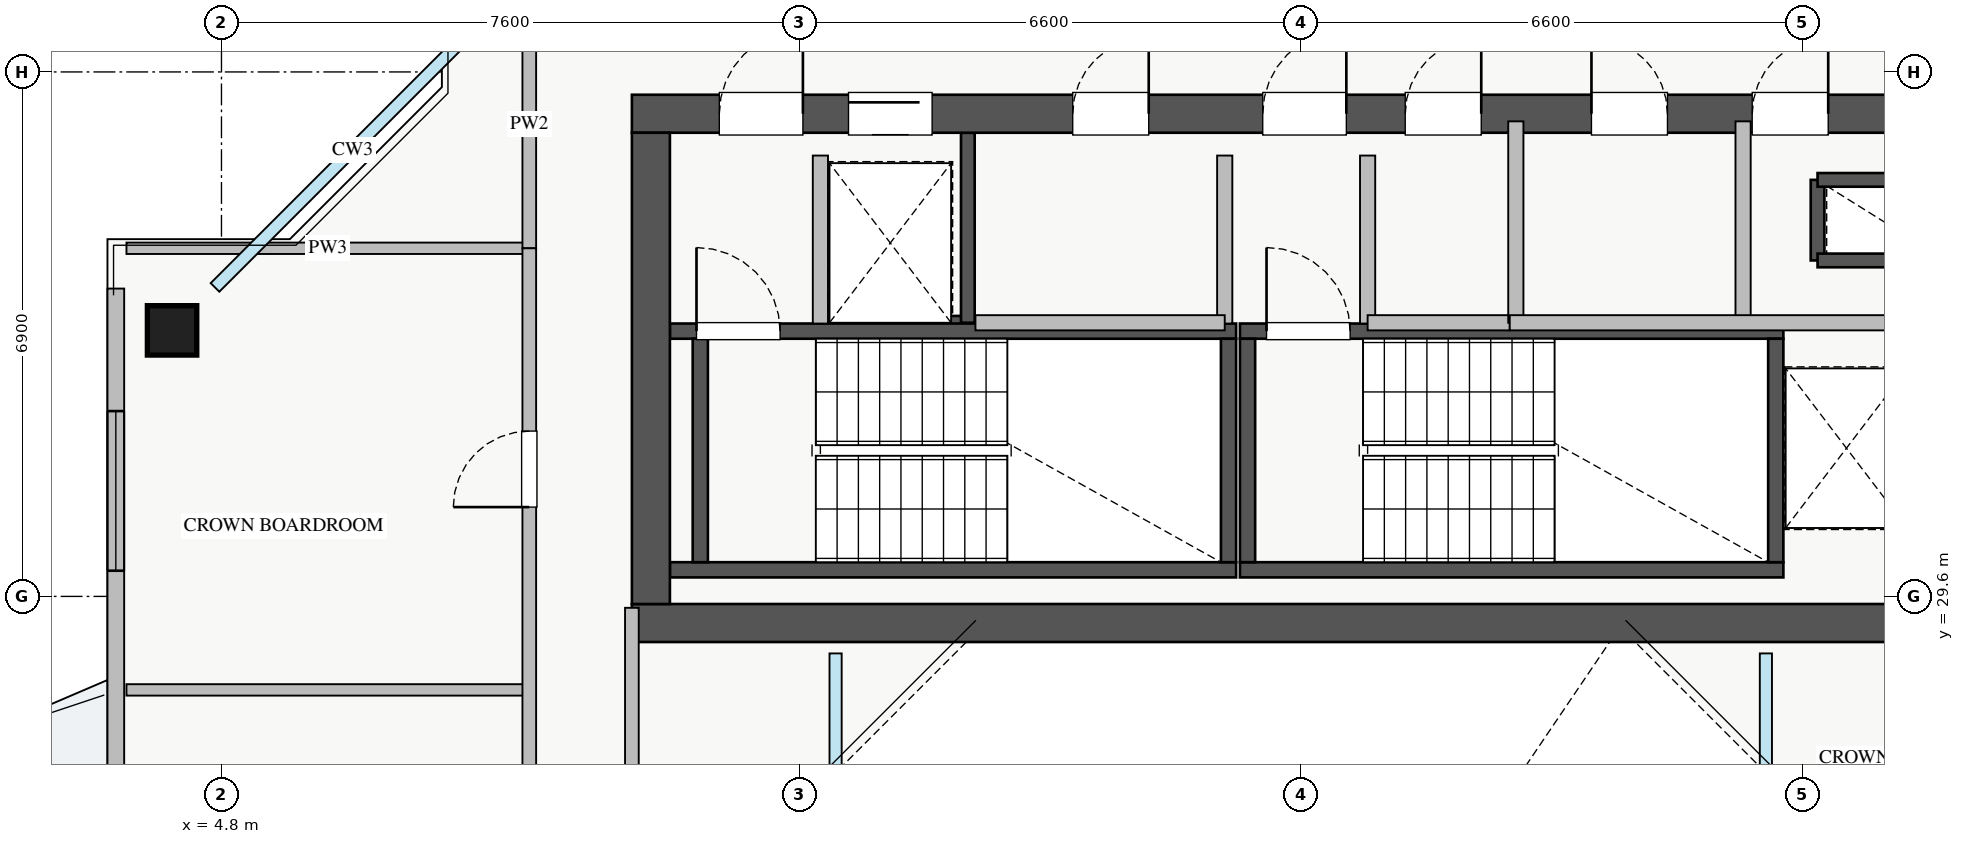
"""IFC4 building model, lengths in metres.
Left out: names, types, materials, properties, quantities, classifications, styles, units other than length and angle.
Written with IfcOpenShell. Run it as: python <this file> out.ifc"""

import sys

from ifc_helpers import new_model, si_unit, direction, frame, frame_2d, origin, origin_2d, place, context, subcontext, project, spatial, rectangle, extrude, source, transform, mapped, element, fill, save


model = new_model("IFC4")
c1 = context("Model", 3, precision=1e-05, world=origin(), true_north=direction((0.0, 1.0)))
c2 = subcontext(c1, "Body", "Model", "MODEL_VIEW")
j1 = project(units=[si_unit("LENGTHUNIT", "METRE"), si_unit("PLANEANGLEUNIT", "RADIAN")], contexts=[c1])
p1 = place(None, origin())
s1 = spatial("IfcSite", under=j1, at=p1, CompositionType="ELEMENT")
p2 = place(p1, origin())
s2 = spatial("IfcBuilding", under=s1, at=p2, CompositionType="ELEMENT")
p3 = place(p2, frame((0.0, 0.0, 237.25)))
s3 = spatial("IfcBuildingStorey", under=s2, at=p3, CompositionType="ELEMENT", Elevation=237.25)
p4 = place(p3, frame((12.68, 33.2, 0.0), z_axis=(0.0, 0.0, 1.0), x_axis=(1.0, 0.0, 0.0)))
e1 = element("IfcWall", 1, at=p4, inside=s3, PredefinedType="SHEAR", context=c2, shape_type="SweptSolid", body=[
    extrude(rectangle(XDim=1.94, YDim=0.18, at=frame_2d((0.97, 0.0))), origin(), (0.0, 0.0, 1.0), 3.07),
])
p5 = place(p3, frame((14.62, 33.2, 0.0), z_axis=(0.0, 0.0, 1.0), x_axis=(0.0, 1.0, 0.0)))
e2 = element("IfcWall", 2, at=p5, inside=s3, PredefinedType="SHEAR", context=c2, shape_type="SweptSolid", body=[
    extrude(rectangle(XDim=2.5, YDim=0.18, at=frame_2d((1.25, 0.0))), origin(), (0.0, 0.0, 1.0), 3.07),
])
p6 = place(p3, frame((25.8, 34.02, 0.0), z_axis=(0.0, 0.0, 1.0), x_axis=(0.0, 1.0, 0.0)))
e3 = element("IfcWall", 3, at=p6, inside=s3, PredefinedType="SHEAR", context=c2, shape_type="SweptSolid", body=[
    extrude(rectangle(XDim=1.06, YDim=0.18, at=frame_2d((0.53, 0.0))), origin(), (0.0, 0.0, 1.0), 3.07),
])
for number, where, z_axis, x_axis in (
    (4, (25.8, 35.08, 0.0), (0.0, 0.0, 1.0), (1.0, 0.0, 0.0)),
    (5, (25.8, 34.02, 0.0), (0.0, 0.0, 1.0), (1.0, 0.0, 0.0)),
):
    element("IfcWall", number, at=place(p3, frame(where, z_axis=z_axis, x_axis=x_axis)), inside=s3, PredefinedType="SHEAR", context=c2, shape_type="SweptSolid", body=[
        extrude(rectangle(XDim=1.5, YDim=0.18, at=frame_2d((0.75, 0.0))), origin(), (0.0, 0.0, 1.0), 3.07),
    ])
p7 = place(p3, frame((10.7, 29.95, 0.0), z_axis=(0.0, 0.0, 1.0), x_axis=(1.0, 0.0, 0.0)))
e6 = element("IfcWall", 6, at=p7, inside=s3, PredefinedType="SHEAR", context=c2, shape_type="SweptSolid", body=[
    extrude(rectangle(XDim=7.45, YDim=0.2, at=frame_2d((3.725, 0.0))), origin(), (0.0, 0.0, 1.0), 3.25),
])
p8 = place(p3, frame((10.7, 33.09, 0.0), z_axis=(0.0, 0.0, 1.0), x_axis=(1.0, 0.0, 0.0)))
e7 = element("IfcWall", 7, at=p8, inside=s3, PredefinedType="SHEAR", context=c2, shape_type="SweptSolid", body=[
    extrude(rectangle(XDim=7.45, YDim=0.2, at=frame_2d((3.725, 0.0))), origin(), (0.0, 0.0, 1.0), 3.25),
])
p9 = place(p8, frame((0.35, 0.0, 0.0)))
e8 = element("IfcOpeningElement", 8, at=p9, cuts=e7, PredefinedType="OPENING", context=c2, shape_type="SweptSolid", body=[
    extrude(rectangle(XDim=1.1, YDim=2.05, at=frame_2d((0.55, 1.025))), frame((0.0, 0.11, 0.0), z_axis=(0.0, -1.0, 0.0), x_axis=(1.0, 0.0, 0.0)), (0.0, 0.0, 1.0), 0.22),
])
for number, where, z_axis, x_axis in (
    (9, (11.1, 30.05, 0.0), (0.0, 0.0, 1.0), (0.0, 1.0, 0.0)),
    (10, (18.05, 30.05, 0.0), (0.0, 0.0, 1.0), (0.0, 1.0, 0.0)),
):
    element("IfcWall", number, at=place(p3, frame(where, z_axis=z_axis, x_axis=x_axis)), inside=s3, PredefinedType="SHEAR", context=c2, shape_type="SweptSolid", body=[
        extrude(rectangle(XDim=2.94, YDim=0.2, at=frame_2d((1.47, 0.0))), origin(), (0.0, 0.0, 1.0), 3.25),
    ])
p10 = place(p3, frame((18.2, 29.95, 0.0), z_axis=(0.0, 0.0, 1.0), x_axis=(1.0, 0.0, 0.0)))
e11 = element("IfcWall", 11, at=p10, inside=s3, PredefinedType="SHEAR", context=c2, shape_type="SweptSolid", body=[
    extrude(rectangle(XDim=7.15, YDim=0.2, at=frame_2d((3.575, 0.0))), origin(), (0.0, 0.0, 1.0), 3.25),
])
p11 = place(p3, frame((18.2, 33.09, 0.0), z_axis=(0.0, 0.0, 1.0), x_axis=(1.0, 0.0, 0.0)))
e12 = element("IfcWall", 12, at=p11, inside=s3, PredefinedType="SHEAR", context=c2, shape_type="SweptSolid", body=[
    extrude(rectangle(XDim=7.15, YDim=0.2, at=frame_2d((3.575, 0.0))), origin(), (0.0, 0.0, 1.0), 3.25),
])
p12 = place(p11, frame((0.35, 0.0, 0.0)))
e13 = element("IfcOpeningElement", 13, at=p12, cuts=e12, PredefinedType="OPENING", context=c2, shape_type="SweptSolid", body=[
    extrude(rectangle(XDim=1.1, YDim=2.05, at=frame_2d((0.55, 1.025))), frame((0.0, 0.11, 0.0), z_axis=(0.0, -1.0, 0.0), x_axis=(1.0, 0.0, 0.0)), (0.0, 0.0, 1.0), 0.22),
])
for number, where, z_axis, x_axis in (
    (14, (18.3, 30.05, 0.0), (0.0, 0.0, 1.0), (0.0, 1.0, 0.0)),
    (15, (25.25, 30.05, 0.0), (0.0, 0.0, 1.0), (0.0, 1.0, 0.0)),
):
    element("IfcWall", number, at=place(p3, frame(where, z_axis=z_axis, x_axis=x_axis)), inside=s3, PredefinedType="SHEAR", context=c2, shape_type="SweptSolid", body=[
        extrude(rectangle(XDim=2.94, YDim=0.2, at=frame_2d((1.47, 0.0))), origin(), (0.0, 0.0, 1.0), 3.25),
    ])
p13 = place(p3, frame((10.2, 29.25, 0.0), z_axis=(0.0, 0.0, 1.0), x_axis=(1.0, 0.0, 0.0)))
e16 = element("IfcWall", 16, at=p13, inside=s3, PredefinedType="SHEAR", context=c2, shape_type="SweptSolid", body=[
    extrude(rectangle(XDim=17.6, YDim=0.5, at=frame_2d((8.8, 0.0))), origin(), (0.0, 0.0, 1.0), 3.25),
])
p14 = place(p3, frame((10.2, 35.95, 0.0), z_axis=(0.0, 0.0, 1.0), x_axis=(1.0, 0.0, 0.0)))
e17 = element("IfcWall", 17, at=p14, inside=s3, PredefinedType="SHEAR", context=c2, shape_type="SweptSolid", body=[
    extrude(rectangle(XDim=17.6, YDim=0.5, at=frame_2d((8.8, 0.0))), origin(), (0.0, 0.0, 1.0), 3.25),
])
p15 = place(p14, frame((1.15, 0.0, 0.0)))
e18 = element("IfcOpeningElement", 18, at=p15, cuts=e17, PredefinedType="OPENING", context=c2, shape_type="SweptSolid", body=[
    extrude(rectangle(XDim=1.1, YDim=2.05, at=frame_2d((0.55, 1.025))), frame((0.0, 0.26, 0.0), z_axis=(0.0, -1.0, 0.0), x_axis=(1.0, 0.0, 0.0)), (0.0, 0.0, 1.0), 0.52),
])
p16 = place(p14, frame((8.3, 0.0, 0.0)))
e19 = element("IfcOpeningElement", 19, at=p16, cuts=e17, PredefinedType="OPENING", context=c2, shape_type="SweptSolid", body=[
    extrude(rectangle(XDim=1.1, YDim=2.05, at=frame_2d((0.55, 1.025))), frame((0.0, 0.26, 0.0), z_axis=(0.0, -1.0, 0.0), x_axis=(1.0, 0.0, 0.0)), (0.0, 0.0, 1.0), 0.52),
])
p17 = place(p14, frame((2.85, 0.0, 0.0)))
e20 = element("IfcOpeningElement", 20, at=p17, cuts=e17, PredefinedType="OPENING", context=c2, shape_type="SweptSolid", body=[
    extrude(rectangle(XDim=1.1, YDim=2.05, at=frame_2d((0.55, 1.025))), frame((0.0, 0.26, 0.0), z_axis=(0.0, -1.0, 0.0), x_axis=(1.0, 0.0, 0.0)), (0.0, 0.0, 1.0), 0.52),
])
p18 = place(p14, frame((5.8, 0.0, 0.0)))
e21 = element("IfcOpeningElement", 21, at=p18, cuts=e17, PredefinedType="OPENING", context=c2, shape_type="SweptSolid", body=[
    extrude(rectangle(XDim=1.0, YDim=2.05, at=frame_2d((0.5, 1.025))), frame((0.0, 0.26, 0.0), z_axis=(0.0, -1.0, 0.0), x_axis=(1.0, 0.0, 0.0)), (0.0, 0.0, 1.0), 0.52),
])
p19 = place(p14, frame((14.74, 0.0, 0.0)))
e22 = element("IfcOpeningElement", 22, at=p19, cuts=e17, PredefinedType="OPENING", context=c2, shape_type="SweptSolid", body=[
    extrude(rectangle(XDim=1.0, YDim=2.05, at=frame_2d((0.5, 1.025))), frame((0.0, 0.26, 0.0), z_axis=(0.0, -1.0, 0.0), x_axis=(1.0, 0.0, 0.0)), (0.0, 0.0, 1.0), 0.52),
])
p20 = place(p14, frame((10.175, 0.0, 0.0)))
e23 = element("IfcOpeningElement", 23, at=p20, cuts=e17, PredefinedType="OPENING", context=c2, shape_type="SweptSolid", body=[
    extrude(rectangle(XDim=1.0, YDim=2.05, at=frame_2d((0.5, 1.025))), frame((0.0, 0.26, 0.0), z_axis=(0.0, -1.0, 0.0), x_axis=(1.0, 0.0, 0.0)), (0.0, 0.0, 1.0), 0.52),
])
p21 = place(p14, frame((12.625, 0.0, 0.0)))
e24 = element("IfcOpeningElement", 24, at=p21, cuts=e17, PredefinedType="OPENING", context=c2, shape_type="SweptSolid", body=[
    extrude(rectangle(XDim=1.0, YDim=2.05, at=frame_2d((0.5, 1.025))), frame((0.0, 0.26, 0.0), z_axis=(0.0, -1.0, 0.0), x_axis=(1.0, 0.0, 0.0)), (0.0, 0.0, 1.0), 0.52),
])
p22 = place(p3, frame((10.45, 29.5, 0.0), z_axis=(0.0, 0.0, 1.0), x_axis=(0.0, 1.0, 0.0)))
e25 = element("IfcWall", 25, at=p22, inside=s3, PredefinedType="SHEAR", context=c2, shape_type="SweptSolid", body=[
    extrude(rectangle(XDim=6.2, YDim=0.5, at=frame_2d((3.1, 0.0))), origin(), (0.0, 0.0, 1.0), 3.25),
])
m1 = source(origin(), c2, "Body", "SweptSolid", [
    extrude(rectangle(XDim=0.65, YDim=0.65, at=origin_2d()), origin(), (0.0, 0.0, 1.0), 3.25),
])
p23 = place(p3, frame((4.15, 33.1, 0.0), z_axis=(0.0, 0.0, 1.0), x_axis=(1.0, 0.0, 0.0)))
e26 = element("IfcColumn", 26, at=p23, inside=s3, PredefinedType="COLUMN", context=c2, shape_type="MappedRepresentation", body=[
    mapped(m1, transform((0.0, 0.0, 0.0), x_axis=(1.0, 0.0, 0.0), y_axis=(0.0, 1.0, 0.0), z_axis=(0.0, 0.0, 1.0), scale=1.0)),
])
p24 = place(p3, frame((3.41, 12.35, 0.0), z_axis=(0.0, 0.0, 1.0), x_axis=(0.0, 1.0, 0.0)))
e27 = element("IfcWall", 27, at=p24, inside=s3, PredefinedType="STANDARD", context=c2, shape_type="SweptSolid", body=[
    extrude(rectangle(XDim=21.3, YDim=0.22, at=frame_2d((10.65, 0.0))), origin(), (0.0, 0.0, 1.0), 2.61),
])
p25 = place(p24, frame((11.5, 0.0, 0.0)))
e28 = element("IfcOpeningElement", 28, at=p25, cuts=e27, PredefinedType="OPENING", context=c2, shape_type="SweptSolid", body=[
    extrude(rectangle(XDim=1.2, YDim=2.1, at=frame_2d((0.6, 1.05))), frame((0.0, 0.12, 0.0), z_axis=(0.0, -1.0, 0.0), x_axis=(1.0, 0.0, 0.0)), (0.0, 0.0, 1.0), 0.24),
])
p26 = place(p24, frame((1.463, 0.0, 0.9)))
e29 = element("IfcOpeningElement", 29, at=p26, cuts=e27, PredefinedType="OPENING", context=c2, shape_type="SweptSolid", body=[
    extrude(rectangle(XDim=2.4, YDim=1.48, at=frame_2d((1.2, 0.74))), frame((0.0, 0.12, 0.0), z_axis=(0.0, -1.0, 0.0), x_axis=(1.0, 0.0, 0.0)), (0.0, 0.0, 1.0), 0.24),
])
p27 = place(p24, frame((17.588, 0.0, 0.9)))
e30 = element("IfcOpeningElement", 30, at=p27, cuts=e27, PredefinedType="OPENING", context=c2, shape_type="SweptSolid", body=[
    extrude(rectangle(XDim=2.1, YDim=1.48, at=frame_2d((1.05, 0.74))), frame((0.0, 0.12, 0.0), z_axis=(0.0, -1.0, 0.0), x_axis=(1.0, 0.0, 0.0)), (0.0, 0.0, 1.0), 0.24),
])
for number, where, z_axis, x_axis in (
    (31, (12.68, 33.19, 0.0), (0.0, 0.0, 1.0), (0.0, 1.0, 0.0)),
    (32, (18.0, 33.19, 0.0), (0.0, 0.0, 1.0), (0.0, 1.0, 0.0)),
    (33, (19.88, 33.19, 0.0), (0.0, 0.0, 1.0), (0.0, 1.0, 0.0)),
):
    element("IfcWall", number, at=place(p3, frame(where, z_axis=z_axis, x_axis=x_axis)), inside=s3, PredefinedType="PARTITIONING", context=c2, shape_type="SweptSolid", body=[
        extrude(rectangle(XDim=2.21, YDim=0.2, at=frame_2d((1.105, 0.0))), origin(), (0.0, 0.0, 1.0), 3.07),
    ])
p28 = place(p3, frame((14.72, 33.2, 0.0), z_axis=(0.0, 0.0, 1.0), x_axis=(1.0, 0.0, 0.0)))
e34 = element("IfcWall", 34, at=p28, inside=s3, PredefinedType="PARTITIONING", context=c2, shape_type="SweptSolid", body=[
    extrude(rectangle(XDim=3.28, YDim=0.2, at=frame_2d((1.64, 0.0))), origin(), (0.0, 0.0, 1.0), 3.07),
])
p29 = place(p3, frame((24.82, 33.2, 0.0), z_axis=(0.0, 0.0, 1.0), x_axis=(0.0, 1.0, 0.0)))
e35 = element("IfcWall", 35, at=p29, inside=s3, PredefinedType="PARTITIONING", context=c2, shape_type="SweptSolid", body=[
    extrude(rectangle(XDim=2.65, YDim=0.2, at=frame_2d((1.325, 0.0))), origin(), (0.0, 0.0, 1.0), 3.07),
])
p30 = place(p3, frame((19.88, 33.2, 0.0), z_axis=(0.0, 0.0, 1.0), x_axis=(1.0, 0.0, 0.0)))
e36 = element("IfcWall", 36, at=p30, inside=s3, PredefinedType="PARTITIONING", context=c2, shape_type="SweptSolid", body=[
    extrude(rectangle(XDim=1.87, YDim=0.2, at=frame_2d((0.935, 0.0))), origin(), (0.0, 0.0, 1.0), 3.07),
])
p31 = place(p3, frame((21.83, 33.2, 0.0), z_axis=(0.0, 0.0, 1.0), x_axis=(0.0, 1.0, 0.0)))
e37 = element("IfcWall", 37, at=p31, inside=s3, PredefinedType="PARTITIONING", context=c2, shape_type="SweptSolid", body=[
    extrude(rectangle(XDim=2.65, YDim=0.2, at=frame_2d((1.325, 0.0))), origin(), (0.0, 0.0, 1.0), 3.07),
])
p32 = place(p3, frame((21.75, 33.2, 0.0), z_axis=(0.0, 0.0, 1.0), x_axis=(1.0, 0.0, 0.0)))
e38 = element("IfcWall", 38, at=p32, inside=s3, PredefinedType="PARTITIONING", context=c2, shape_type="SweptSolid", body=[
    extrude(rectangle(XDim=5.17, YDim=0.2, at=frame_2d((2.585, 0.0))), origin(), (0.0, 0.0, 1.0), 3.07),
])
p33 = place(p3, frame((3.55, 34.18, 0.0), z_axis=(0.0, 0.0, 1.0), x_axis=(1.0, 0.0, 0.0)))
e39 = element("IfcWall", 39, at=p33, inside=s3, PredefinedType="PARTITIONING", context=c2, shape_type="SweptSolid", body=[
    extrude(rectangle(XDim=5.3, YDim=0.15, at=frame_2d((2.65, 0.0))), origin(), (0.0, 0.0, 1.0), 3.07),
])
p34 = place(p3, frame((8.85, 34.18, 0.0), z_axis=(0.0, 0.0, 1.0), x_axis=(0.0, 1.0, 0.0)))
e40 = element("IfcWall", 40, at=p34, inside=s3, PredefinedType="PARTITIONING", context=c2, shape_type="SweptSolid", body=[
    extrude(rectangle(XDim=3.26, YDim=0.18, at=frame_2d((1.63, 0.0))), origin(), (0.0, 0.0, 1.0), 2.569),
])
p35 = place(p3, frame((3.55, 28.37, 0.0), z_axis=(0.0, 0.0, 1.0), x_axis=(1.0, 0.0, 0.0)))
e41 = element("IfcWall", 41, at=p35, inside=s3, PredefinedType="PARTITIONING", context=c2, shape_type="SweptSolid", body=[
    extrude(rectangle(XDim=5.3, YDim=0.15, at=frame_2d((2.65, 0.0))), origin(), (0.0, 0.0, 1.0), 3.07),
])
p36 = place(p3, frame((8.85, 11.82, 0.0), z_axis=(0.0, 0.0, 1.0), x_axis=(0.0, 1.0, 0.0)))
e42 = element("IfcWall", 42, at=p36, inside=s3, PredefinedType="PARTITIONING", context=c2, shape_type="SweptSolid", body=[
    extrude(rectangle(XDim=22.36, YDim=0.18, at=frame_2d((11.18, 0.0))), origin(), (0.0, 0.0, 1.0), 2.569),
])
p37 = place(p36, frame((4.42, 0.0, 0.0)))
e43 = element("IfcOpeningElement", 43, at=p37, cuts=e42, PredefinedType="OPENING", context=c2, shape_type="SweptSolid", body=[
    extrude(rectangle(XDim=1.0, YDim=2.05, at=frame_2d((0.5, 1.025))), frame((0.0, 0.1, 0.0), z_axis=(0.0, -1.0, 0.0), x_axis=(1.0, 0.0, 0.0)), (0.0, 0.0, 1.0), 0.2),
])
p38 = place(p36, frame((12.695, 0.0, 0.0)))
e44 = element("IfcOpeningElement", 44, at=p38, cuts=e42, PredefinedType="OPENING", context=c2, shape_type="SweptSolid", body=[
    extrude(rectangle(XDim=1.0, YDim=2.05, at=frame_2d((0.5, 1.025))), frame((0.0, 0.1, 0.0), z_axis=(0.0, -1.0, 0.0), x_axis=(1.0, 0.0, 0.0)), (0.0, 0.0, 1.0), 0.2),
])
p39 = place(p36, frame((18.955, 0.0, 0.0)))
e45 = element("IfcOpeningElement", 45, at=p39, cuts=e42, PredefinedType="OPENING", context=c2, shape_type="SweptSolid", body=[
    extrude(rectangle(XDim=1.0, YDim=2.05, at=frame_2d((0.5, 1.025))), frame((0.0, 0.1, 0.0), z_axis=(0.0, -1.0, 0.0), x_axis=(1.0, 0.0, 0.0)), (0.0, 0.0, 1.0), 0.2),
])
p40 = place(p3, frame((10.2, 16.55, 0.0), z_axis=(0.0, 0.0, 1.0), x_axis=(0.0, 1.0, 0.0)))
e46 = element("IfcWall", 46, at=p40, inside=s3, PredefinedType="PARTITIONING", context=c2, shape_type="SweptSolid", body=[
    extrude(rectangle(XDim=12.9, YDim=0.18, at=frame_2d((6.45, 0.0))), origin(), (0.0, 0.0, 1.0), 3.07),
])
p41 = place(p40, frame((2.025, 0.0, 0.0)))
e47 = element("IfcOpeningElement", 47, at=p41, cuts=e46, PredefinedType="OPENING", context=c2, shape_type="SweptSolid", body=[
    extrude(rectangle(XDim=0.85, YDim=2.05, at=frame_2d((0.425, 1.025))), frame((0.0, 0.1, 0.0), z_axis=(0.0, -1.0, 0.0), x_axis=(1.0, 0.0, 0.0)), (0.0, 0.0, 1.0), 0.2),
])
p42 = place(p40, frame((8.0, 0.0, 0.0)))
e48 = element("IfcOpeningElement", 48, at=p42, cuts=e46, PredefinedType="OPENING", context=c2, shape_type="SweptSolid", body=[
    extrude(rectangle(XDim=0.9, YDim=2.05, at=frame_2d((0.45, 1.025))), frame((0.0, 0.1, 0.0), z_axis=(0.0, -1.0, 0.0), x_axis=(1.0, 0.0, 0.0)), (0.0, 0.0, 1.0), 0.2),
])
m2 = source(origin(), c2, "Body", "SweptSolid", [
    extrude(rectangle(XDim=2.1, YDim=1.48, at=frame_2d((1.05, 0.74))), frame((0.0, 0.03, 0.0), z_axis=(0.0, -1.0, 0.0), x_axis=(1.0, 0.0, 0.0)), (0.0, 0.0, 1.0), 0.06),
])
p43 = place(p27, origin())
e49 = element("IfcWindow", 49, at=p43, inside=s3, PartitioningType="TRIPLE_PANEL_VERTICAL", PredefinedType="WINDOW", context=c2, shape_type="MappedRepresentation", body=[
    mapped(m2, transform((0.0, 0.0, 0.0), x_axis=(1.0, 0.0, 0.0), y_axis=(0.0, 1.0, 0.0), z_axis=(0.0, 0.0, 1.0), scale=1.0)),
])
fill(e30, e49)
m3 = source(origin(), c2, "Body", "SweptSolid", [
    extrude(rectangle(XDim=1.1, YDim=2.05, at=frame_2d((0.55, 1.025))), frame((0.0, 0.025, 0.0), z_axis=(0.0, -1.0, 0.0), x_axis=(1.0, 0.0, 0.0)), (0.0, 0.0, 1.0), 0.05),
])
p44 = place(p15, origin())
e50 = element("IfcDoor", 50, at=p44, inside=s3, OperationType="SINGLE_SWING_RIGHT", PredefinedType="DOOR", context=c2, shape_type="MappedRepresentation", body=[
    mapped(m3, transform((0.0, 0.0, 0.0), x_axis=(1.0, 0.0, 0.0), y_axis=(0.0, 1.0, 0.0), z_axis=(0.0, 0.0, 1.0), scale=1.0)),
])
fill(e18, e50)
p45 = place(p9, origin())
e51 = element("IfcDoor", 51, at=p45, inside=s3, OperationType="SINGLE_SWING_LEFT", PredefinedType="DOOR", context=c2, shape_type="MappedRepresentation", body=[
    mapped(m3, transform((0.0, 0.0, 0.0), x_axis=(1.0, 0.0, 0.0), y_axis=(0.0, 1.0, 0.0), z_axis=(0.0, 0.0, 1.0), scale=1.0)),
])
fill(e8, e51)
p46 = place(p16, origin())
e52 = element("IfcDoor", 52, at=p46, inside=s3, OperationType="SINGLE_SWING_RIGHT", PredefinedType="DOOR", context=c2, shape_type="MappedRepresentation", body=[
    mapped(m3, transform((0.0, 0.0, 0.0), x_axis=(1.0, 0.0, 0.0), y_axis=(0.0, 1.0, 0.0), z_axis=(0.0, 0.0, 1.0), scale=1.0)),
])
fill(e19, e52)
p47 = place(p12, origin())
e53 = element("IfcDoor", 53, at=p47, inside=s3, OperationType="SINGLE_SWING_LEFT", PredefinedType="DOOR", context=c2, shape_type="MappedRepresentation", body=[
    mapped(m3, transform((0.0, 0.0, 0.0), x_axis=(1.0, 0.0, 0.0), y_axis=(0.0, 1.0, 0.0), z_axis=(0.0, 0.0, 1.0), scale=1.0)),
])
fill(e13, e53)
p48 = place(p17, origin())
e54 = element("IfcDoor", 54, at=p48, inside=s3, OperationType="SLIDING_TO_LEFT", PredefinedType="DOOR", context=c2, shape_type="MappedRepresentation", body=[
    mapped(m3, transform((0.0, 0.0, 0.0), x_axis=(1.0, 0.0, 0.0), y_axis=(0.0, 1.0, 0.0), z_axis=(0.0, 0.0, 1.0), scale=1.0)),
])
fill(e20, e54)
m4 = source(origin(), c2, "Body", "SweptSolid", [
    extrude(rectangle(XDim=1.0, YDim=2.05, at=frame_2d((0.5, 1.025))), frame((0.0, 0.025, 0.0), z_axis=(0.0, -1.0, 0.0), x_axis=(1.0, 0.0, 0.0)), (0.0, 0.0, 1.0), 0.05),
])
p49 = place(p18, origin())
e55 = element("IfcDoor", 55, at=p49, inside=s3, OperationType="SINGLE_SWING_RIGHT", PredefinedType="DOOR", context=c2, shape_type="MappedRepresentation", body=[
    mapped(m4, transform((0.0, 0.0, 0.0), x_axis=(1.0, 0.0, 0.0), y_axis=(0.0, 1.0, 0.0), z_axis=(0.0, 0.0, 1.0), scale=1.0)),
])
fill(e21, e55)
p50 = place(p19, origin())
e56 = element("IfcDoor", 56, at=p50, inside=s3, OperationType="SINGLE_SWING_RIGHT", PredefinedType="DOOR", context=c2, shape_type="MappedRepresentation", body=[
    mapped(m4, transform((0.0, 0.0, 0.0), x_axis=(1.0, 0.0, 0.0), y_axis=(0.0, 1.0, 0.0), z_axis=(0.0, 0.0, 1.0), scale=1.0)),
])
fill(e22, e56)
p51 = place(p20, origin())
e57 = element("IfcDoor", 57, at=p51, inside=s3, OperationType="SINGLE_SWING_RIGHT", PredefinedType="DOOR", context=c2, shape_type="MappedRepresentation", body=[
    mapped(m4, transform((0.0, 0.0, 0.0), x_axis=(1.0, 0.0, 0.0), y_axis=(0.0, 1.0, 0.0), z_axis=(0.0, 0.0, 1.0), scale=1.0)),
])
fill(e23, e57)
p52 = place(p21, origin())
e58 = element("IfcDoor", 58, at=p52, inside=s3, OperationType="SINGLE_SWING_LEFT", PredefinedType="DOOR", context=c2, shape_type="MappedRepresentation", body=[
    mapped(m4, transform((0.0, 0.0, 0.0), x_axis=(1.0, 0.0, 0.0), y_axis=(0.0, 1.0, 0.0), z_axis=(0.0, 0.0, 1.0), scale=1.0)),
])
fill(e24, e58)
p53 = place(p39, origin())
e59 = element("IfcDoor", 59, at=p53, inside=s3, OperationType="SINGLE_SWING_LEFT", PredefinedType="DOOR", context=c2, shape_type="MappedRepresentation", body=[
    mapped(m4, transform((0.0, 0.0, 0.0), x_axis=(1.0, 0.0, 0.0), y_axis=(0.0, 1.0, 0.0), z_axis=(0.0, 0.0, 1.0), scale=1.0)),
])
fill(e45, e59)
save(model, sys.argv[1])
